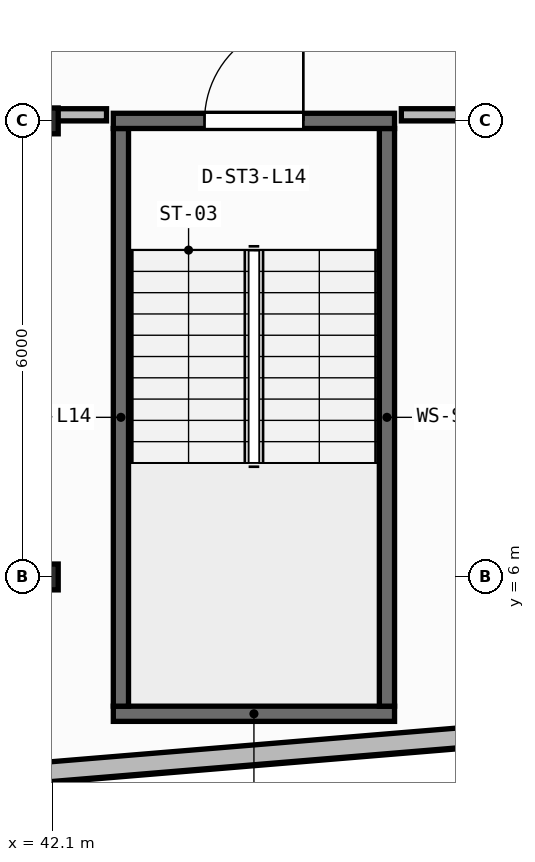
"""IFC4 building model, lengths in metres.
Left out: names, types, materials, properties, quantities, classifications, styles, units other than length and angle.
Written with IfcOpenShell. Run it as: python <this file> out.ifc"""

import sys

from ifc_helpers import new_model, si_unit, direction, frame, frame_2d, origin, origin_2d, place, context, subcontext, project, spatial, rectangle, i_section, extrude, element, fill, save


model = new_model("IFC4")
c1 = context("Model", 3, precision=1e-05, world=origin(), true_north=direction((0.0, 1.0)))
c2 = subcontext(c1, "Body", "Model", "MODEL_VIEW")
j1 = project(units=[si_unit("LENGTHUNIT", "METRE"), si_unit("PLANEANGLEUNIT", "RADIAN")], contexts=[c1])
p1 = place(None, origin())
s1 = spatial("IfcSite", under=j1, at=p1, CompositionType="ELEMENT")
p2 = place(p1, origin())
s2 = spatial("IfcBuilding", under=s1, at=p2, CompositionType="ELEMENT")
p3 = place(p2, frame((0.0, 0.0, 58.05)))
s3 = spatial("IfcBuildingStorey", under=s2, at=p3, CompositionType="ELEMENT", Elevation=58.05)
for number, where, z_axis, x_axis in (
    (1, (42.0, 6.0, 0.0), (0.0, 0.0, 1.0), (1.0, 0.0, 0.0)),
    (2, (42.0, 12.0, 0.0), (0.0, 0.0, 1.0), (1.0, 0.0, 0.0)),
):
    element("IfcColumn", number, at=place(p3, frame(where, z_axis=z_axis, x_axis=x_axis)), inside=s3, PredefinedType="COLUMN", context=c2, shape_type="SweptSolid", body=[
        extrude(i_section(OverallWidth=0.35, OverallDepth=0.34, WebThickness=0.016, FlangeThickness=0.028, at=origin_2d()), origin(), (0.0, 0.0, 1.0), 3.95),
    ])
p4 = place(p3, frame((2.76, 0.174, 0.0), z_axis=(0.0, 0.0, 1.0), x_axis=(0.996571478456, 0.082736257641, 0.0)))
e3 = element("IfcWall", 3, at=p4, inside=s3, PredefinedType="STANDARD", context=c2, shape_type="SweptSolid", body=[
    extrude(rectangle(XDim=52.861, YDim=0.26, at=frame_2d((26.431, 0.0))), origin(), (0.0, 0.0, 1.0), 3.71),
])
p5 = place(p4, frame((25.231, 0.0, 0.9)))
e4 = element("IfcOpeningElement", 4, at=p5, cuts=e3, PredefinedType="OPENING", context=c2, shape_type="SweptSolid", body=[
    extrude(rectangle(XDim=2.4, YDim=1.65, at=frame_2d((1.2, 0.825))), frame((0.0, 0.14, 0.0), z_axis=(0.0, -1.0, 0.0), x_axis=(1.0, 0.0, 0.0)), (0.0, 0.0, 1.0), 0.28),
])
p6 = place(p3, frame((42.9, 4.2, 0.0), z_axis=(0.0, 0.0, 1.0), x_axis=(1.0, 0.0, 0.0)))
e5 = element("IfcWall", 5, at=p6, inside=s3, PredefinedType="SHEAR", context=c2, shape_type="SweptSolid", body=[
    extrude(rectangle(XDim=3.7, YDim=0.2, at=frame_2d((1.85, 0.0))), origin(), (0.0, 0.0, 1.0), 3.71),
])
for number, where, z_axis, x_axis in (
    (6, (43.0, 4.3, 0.0), (0.0, 0.0, 1.0), (0.0, 1.0, 0.0)),
    (7, (46.5, 4.3, 0.0), (0.0, 0.0, 1.0), (0.0, 1.0, 0.0)),
):
    element("IfcWall", number, at=place(p3, frame(where, z_axis=z_axis, x_axis=x_axis)), inside=s3, PredefinedType="SHEAR", context=c2, shape_type="SweptSolid", body=[
        extrude(rectangle(XDim=7.6, YDim=0.2, at=frame_2d((3.8, 0.0))), origin(), (0.0, 0.0, 1.0), 3.71),
    ])
p7 = place(p3, frame((42.9, 12.0, 0.0), z_axis=(0.0, 0.0, 1.0), x_axis=(1.0, 0.0, 0.0)))
e8 = element("IfcWall", 8, at=p7, inside=s3, PredefinedType="SHEAR", context=c2, shape_type="SweptSolid", body=[
    extrude(rectangle(XDim=3.7, YDim=0.2, at=frame_2d((1.85, 0.0))), origin(), (0.0, 0.0, 1.0), 3.71),
])
p8 = place(p7, frame((1.2, 0.0, 0.0)))
e9 = element("IfcOpeningElement", 9, at=p8, cuts=e8, PredefinedType="OPENING", context=c2, shape_type="SweptSolid", body=[
    extrude(rectangle(XDim=1.3, YDim=2.15, at=frame_2d((0.65, 1.075))), frame((0.0, 0.11, 0.0), z_axis=(0.0, -1.0, 0.0), x_axis=(1.0, 0.0, 0.0)), (0.0, 0.0, 1.0), 0.22),
])
p9 = place(p3, frame((31.63, 12.08, 0.0), z_axis=(0.0, 0.0, 1.0), x_axis=(1.0, 0.0, 0.0)))
e10 = element("IfcWall", 10, at=p9, inside=s3, PredefinedType="PARTITIONING", context=c2, shape_type="SweptSolid", body=[
    extrude(rectangle(XDim=11.181, YDim=0.16, at=frame_2d((5.59, 0.0))), origin(), (0.0, 0.0, 1.0), 3.073),
])
p10 = place(p3, frame((46.689, 12.08, 0.0), z_axis=(0.0, 0.0, 1.0), x_axis=(1.0, 0.0, 0.0)))
e11 = element("IfcWall", 11, at=p10, inside=s3, PredefinedType="PARTITIONING", context=c2, shape_type="SweptSolid", body=[
    extrude(rectangle(XDim=3.011, YDim=0.16, at=frame_2d((1.505, 0.0))), origin(), (0.0, 0.0, 1.0), 3.073),
])
p11 = place(p8, origin())
e12 = element("IfcDoor", 12, at=p11, inside=s3, OperationType="SINGLE_SWING_RIGHT", PredefinedType="DOOR", context=c2, shape_type="SweptSolid", body=[
    extrude(rectangle(XDim=1.3, YDim=2.15, at=frame_2d((0.65, 1.075))), frame((0.0, 0.025, 0.0), z_axis=(0.0, -1.0, 0.0), x_axis=(1.0, 0.0, 0.0)), (0.0, 0.0, 1.0), 0.05),
])
fill(e9, e12)
save(model, sys.argv[1])
